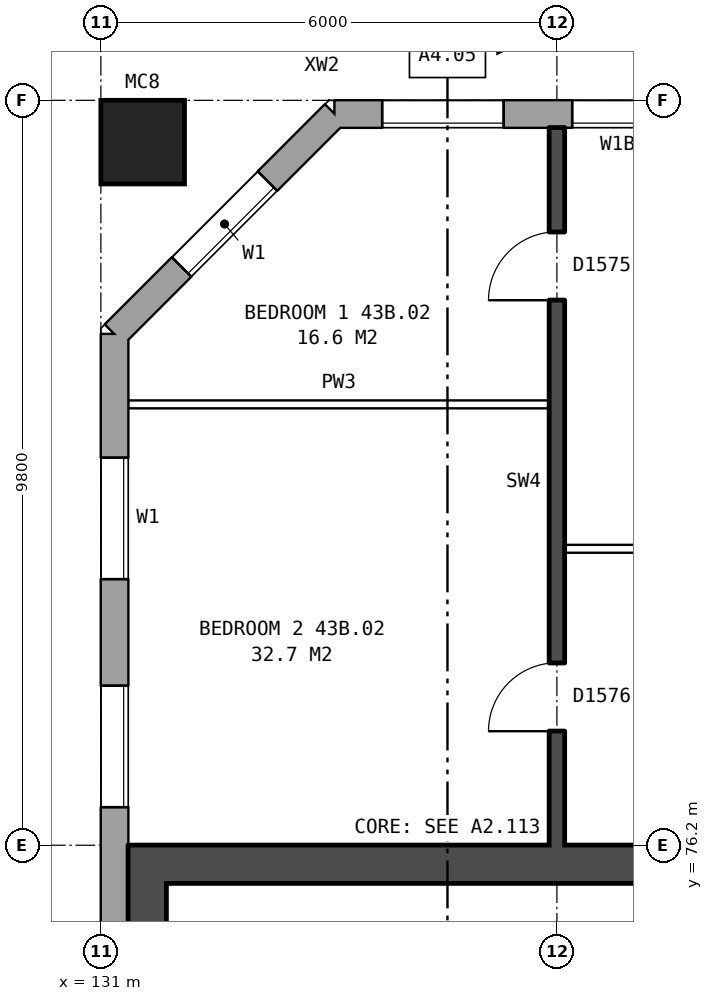
"""IFC4 building model, lengths in metres.
Left out: names, types, materials, properties, quantities, classifications, styles, units other than length and angle.
Written with IfcOpenShell. Run it as: python <this file> out.ifc"""

import sys

from ifc_helpers import new_model, si_unit, direction, frame, frame_2d, origin, origin_2d, place, context, subcontext, project, spatial, rectangle, hollow_rectangle, extrude, element, fill, save


model = new_model("IFC4")
c1 = context("Model", 3, precision=1e-05, world=origin(), true_north=direction((0.0, 1.0)))
c2 = subcontext(c1, "Body", "Model", "MODEL_VIEW")
j1 = project(units=[si_unit("LENGTHUNIT", "METRE"), si_unit("PLANEANGLEUNIT", "RADIAN")], contexts=[c1])
p1 = place(None, origin())
s1 = spatial("IfcSite", under=j1, at=p1, CompositionType="ELEMENT")
p2 = place(p1, origin())
s2 = spatial("IfcBuilding", under=s1, at=p2, CompositionType="ELEMENT")
p3 = place(p2, frame((0.0, 0.0, 154.7)))
s3 = spatial("IfcBuildingStorey", under=s2, at=p3, CompositionType="ELEMENT", Elevation=154.7)
p4 = place(p3, frame((131.55, 85.45, 0.0), z_axis=(0.0, 0.0, 1.0), x_axis=(1.0, 0.0, 0.0)))
e1 = element("IfcColumn", 1, at=p4, inside=s3, PredefinedType="COLUMN", context=c2, shape_type="SweptSolid", body=[
    extrude(hollow_rectangle(XDim=1.1, YDim=1.1, WallThickness=0.06, at=origin_2d()), origin(), (0.0, 0.0, 1.0), 3.1),
])
p5 = place(p3, frame((168.425, 85.82, 0.0), z_axis=(0.0, 0.0, 1.0), x_axis=(-1.0, 0.0, 0.0)))
e2 = element("IfcWall", 2, at=p5, inside=s3, PredefinedType="STANDARD", context=c2, shape_type="SweptSolid", body=[
    extrude(rectangle(XDim=34.351, YDim=0.36, at=frame_2d((17.175, 0.0))), origin(), (0.0, 0.0, 1.0), 2.85),
])
p6 = place(p5, frame((2.125, 0.0, 0.8)))
e3 = element("IfcOpeningElement", 3, at=p6, cuts=e2, PredefinedType="OPENING", context=c2, shape_type="SweptSolid", body=[
    extrude(rectangle(XDim=1.6, YDim=1.8, at=frame_2d((0.8, 0.9))), frame((0.0, 0.19, 0.0), z_axis=(0.0, -1.0, 0.0), x_axis=(1.0, 0.0, 0.0)), (0.0, 0.0, 1.0), 0.38),
])
p7 = place(p5, frame((4.025, 0.0, 1.7)))
e4 = element("IfcOpeningElement", 4, at=p7, cuts=e2, PredefinedType="OPENING", context=c2, shape_type="SweptSolid", body=[
    extrude(rectangle(XDim=1.4, YDim=0.9, at=frame_2d((0.7, 0.45))), frame((0.0, 0.19, 0.0), z_axis=(0.0, -1.0, 0.0), x_axis=(1.0, 0.0, 0.0)), (0.0, 0.0, 1.0), 0.38),
])
p8 = place(p5, frame((8.125, 0.0, 0.8)))
e5 = element("IfcOpeningElement", 5, at=p8, cuts=e2, PredefinedType="OPENING", context=c2, shape_type="SweptSolid", body=[
    extrude(rectangle(XDim=1.6, YDim=1.8, at=frame_2d((0.8, 0.9))), frame((0.0, 0.19, 0.0), z_axis=(0.0, -1.0, 0.0), x_axis=(1.0, 0.0, 0.0)), (0.0, 0.0, 1.0), 0.38),
])
p9 = place(p5, frame((11.125, 0.0, 0.8)))
e6 = element("IfcOpeningElement", 6, at=p9, cuts=e2, PredefinedType="OPENING", context=c2, shape_type="SweptSolid", body=[
    extrude(rectangle(XDim=1.6, YDim=1.8, at=frame_2d((0.8, 0.9))), frame((0.0, 0.19, 0.0), z_axis=(0.0, -1.0, 0.0), x_axis=(1.0, 0.0, 0.0)), (0.0, 0.0, 1.0), 0.38),
])
p10 = place(p5, frame((14.125, 0.0, 0.8)))
e7 = element("IfcOpeningElement", 7, at=p10, cuts=e2, PredefinedType="OPENING", context=c2, shape_type="SweptSolid", body=[
    extrude(rectangle(XDim=1.6, YDim=1.8, at=frame_2d((0.8, 0.9))), frame((0.0, 0.19, 0.0), z_axis=(0.0, -1.0, 0.0), x_axis=(1.0, 0.0, 0.0)), (0.0, 0.0, 1.0), 0.38),
])
p11 = place(p5, frame((17.125, 0.0, 0.8)))
e8 = element("IfcOpeningElement", 8, at=p11, cuts=e2, PredefinedType="OPENING", context=c2, shape_type="SweptSolid", body=[
    extrude(rectangle(XDim=1.6, YDim=1.8, at=frame_2d((0.8, 0.9))), frame((0.0, 0.19, 0.0), z_axis=(0.0, -1.0, 0.0), x_axis=(1.0, 0.0, 0.0)), (0.0, 0.0, 1.0), 0.38),
])
p12 = place(p5, frame((20.125, 0.0, 0.8)))
e9 = element("IfcOpeningElement", 9, at=p12, cuts=e2, PredefinedType="OPENING", context=c2, shape_type="SweptSolid", body=[
    extrude(rectangle(XDim=1.6, YDim=1.8, at=frame_2d((0.8, 0.9))), frame((0.0, 0.19, 0.0), z_axis=(0.0, -1.0, 0.0), x_axis=(1.0, 0.0, 0.0)), (0.0, 0.0, 1.0), 0.38),
])
p13 = place(p5, frame((23.125, 0.0, 0.8)))
e10 = element("IfcOpeningElement", 10, at=p13, cuts=e2, PredefinedType="OPENING", context=c2, shape_type="SweptSolid", body=[
    extrude(rectangle(XDim=1.6, YDim=1.8, at=frame_2d((0.8, 0.9))), frame((0.0, 0.19, 0.0), z_axis=(0.0, -1.0, 0.0), x_axis=(1.0, 0.0, 0.0)), (0.0, 0.0, 1.0), 0.38),
])
p14 = place(p5, frame((25.625, 0.0, 0.8)))
e11 = element("IfcOpeningElement", 11, at=p14, cuts=e2, PredefinedType="OPENING", context=c2, shape_type="SweptSolid", body=[
    extrude(rectangle(XDim=1.0, YDim=1.8, at=frame_2d((0.5, 0.9))), frame((0.0, 0.19, 0.0), z_axis=(0.0, -1.0, 0.0), x_axis=(1.0, 0.0, 0.0)), (0.0, 0.0, 1.0), 0.38),
])
p15 = place(p5, frame((26.925, 0.0, 0.8)))
e12 = element("IfcOpeningElement", 12, at=p15, cuts=e2, PredefinedType="OPENING", context=c2, shape_type="SweptSolid", body=[
    extrude(rectangle(XDim=0.8, YDim=0.9, at=frame_2d((0.4, 0.45))), frame((0.0, 0.19, 0.0), z_axis=(0.0, -1.0, 0.0), x_axis=(1.0, 0.0, 0.0)), (0.0, 0.0, 1.0), 0.38),
])
p16 = place(p5, frame((32.125, 0.0, 0.8)))
e13 = element("IfcOpeningElement", 13, at=p16, cuts=e2, PredefinedType="OPENING", context=c2, shape_type="SweptSolid", body=[
    extrude(rectangle(XDim=1.6, YDim=1.8, at=frame_2d((0.8, 0.9))), frame((0.0, 0.19, 0.0), z_axis=(0.0, -1.0, 0.0), x_axis=(1.0, 0.0, 0.0)), (0.0, 0.0, 1.0), 0.38),
])
p17 = place(p5, frame((6.625, 0.0, 0.8)))
e14 = element("IfcOpeningElement", 14, at=p17, cuts=e2, PredefinedType="OPENING", context=c2, shape_type="SweptSolid", body=[
    extrude(rectangle(XDim=0.6, YDim=0.9, at=frame_2d((0.3, 0.45))), frame((0.0, 0.19, 0.0), z_axis=(0.0, -1.0, 0.0), x_axis=(1.0, 0.0, 0.0)), (0.0, 0.0, 1.0), 0.38),
])
p18 = place(p5, frame((28.925, 0.0, 1.7)))
e15 = element("IfcOpeningElement", 15, at=p18, cuts=e2, PredefinedType="OPENING", context=c2, shape_type="SweptSolid", body=[
    extrude(rectangle(XDim=0.8, YDim=0.9, at=frame_2d((0.4, 0.45))), frame((0.0, 0.19, 0.0), z_axis=(0.0, -1.0, 0.0), x_axis=(1.0, 0.0, 0.0)), (0.0, 0.0, 1.0), 0.38),
])
p19 = place(p5, frame((30.025, 0.0, 0.8)))
e16 = element("IfcOpeningElement", 16, at=p19, cuts=e2, PredefinedType="OPENING", context=c2, shape_type="SweptSolid", body=[
    extrude(rectangle(XDim=1.2, YDim=1.8, at=frame_2d((0.6, 0.9))), frame((0.0, 0.19, 0.0), z_axis=(0.0, -1.0, 0.0), x_axis=(1.0, 0.0, 0.0)), (0.0, 0.0, 1.0), 0.38),
])
p20 = place(p3, frame((134.075, 85.82, 0.0), z_axis=(0.0, 0.0, 1.0), x_axis=(-0.707106781187, -0.707106781187, 0.0)))
e17 = element("IfcWall", 17, at=p20, inside=s3, PredefinedType="STANDARD", context=c2, shape_type="SweptSolid", body=[
    extrude(rectangle(XDim=4.094, YDim=0.36, at=frame_2d((2.047, 0.0))), origin(), (0.0, 0.0, 1.0), 2.85),
])
p21 = place(p20, frame((1.247, 0.0, 0.8)))
e18 = element("IfcOpeningElement", 18, at=p21, cuts=e17, PredefinedType="OPENING", context=c2, shape_type="SweptSolid", body=[
    extrude(rectangle(XDim=1.6, YDim=1.8, at=frame_2d((0.8, 0.9))), frame((0.0, 0.19, 0.0), z_axis=(0.0, -1.0, 0.0), x_axis=(1.0, 0.0, 0.0)), (0.0, 0.0, 1.0), 0.38),
])
p22 = place(p3, frame((131.18, 82.925, 0.0), z_axis=(0.0, 0.0, 1.0), x_axis=(0.0, -1.0, 0.0)))
e19 = element("IfcWall", 19, at=p22, inside=s3, PredefinedType="STANDARD", context=c2, shape_type="SweptSolid", body=[
    extrude(rectangle(XDim=25.851, YDim=0.36, at=frame_2d((12.925, 0.0))), origin(), (0.0, 0.0, 1.0), 2.85),
])
p23 = place(p22, frame((1.625, 0.0, 0.8)))
e20 = element("IfcOpeningElement", 20, at=p23, cuts=e19, PredefinedType="OPENING", context=c2, shape_type="SweptSolid", body=[
    extrude(rectangle(XDim=1.6, YDim=1.8, at=frame_2d((0.8, 0.9))), frame((0.0, 0.19, 0.0), z_axis=(0.0, -1.0, 0.0), x_axis=(1.0, 0.0, 0.0)), (0.0, 0.0, 1.0), 0.38),
])
p24 = place(p22, frame((4.625, 0.0, 0.8)))
e21 = element("IfcOpeningElement", 21, at=p24, cuts=e19, PredefinedType="OPENING", context=c2, shape_type="SweptSolid", body=[
    extrude(rectangle(XDim=1.6, YDim=1.8, at=frame_2d((0.8, 0.9))), frame((0.0, 0.19, 0.0), z_axis=(0.0, -1.0, 0.0), x_axis=(1.0, 0.0, 0.0)), (0.0, 0.0, 1.0), 0.38),
])
p25 = place(p22, frame((19.625, 0.0, 0.8)))
e22 = element("IfcOpeningElement", 22, at=p25, cuts=e19, PredefinedType="OPENING", context=c2, shape_type="SweptSolid", body=[
    extrude(rectangle(XDim=1.6, YDim=1.8, at=frame_2d((0.8, 0.9))), frame((0.0, 0.19, 0.0), z_axis=(0.0, -1.0, 0.0), x_axis=(1.0, 0.0, 0.0)), (0.0, 0.0, 1.0), 0.38),
])
p26 = place(p22, frame((22.625, 0.0, 0.8)))
e23 = element("IfcOpeningElement", 23, at=p26, cuts=e19, PredefinedType="OPENING", context=c2, shape_type="SweptSolid", body=[
    extrude(rectangle(XDim=1.6, YDim=1.8, at=frame_2d((0.8, 0.9))), frame((0.0, 0.19, 0.0), z_axis=(0.0, -1.0, 0.0), x_axis=(1.0, 0.0, 0.0)), (0.0, 0.0, 1.0), 0.38),
])
p27 = place(p3, frame((131.61, 63.8, 0.0), z_axis=(0.0, 0.0, 1.0), x_axis=(0.0, 1.0, 0.0)))
e24 = element("IfcWall", 24, at=p27, inside=s3, PredefinedType="SHEAR", context=c2, shape_type="SweptSolid", body=[
    extrude(rectangle(XDim=12.4, YDim=0.5, at=frame_2d((6.2, 0.0))), origin(), (0.0, 0.0, 1.0), 2.85),
])
p28 = place(p3, frame((139.26, 75.95, 0.0), z_axis=(0.0, 0.0, 1.0), x_axis=(-1.0, 0.0, 0.0)))
e25 = element("IfcWall", 25, at=p28, inside=s3, PredefinedType="SHEAR", context=c2, shape_type="SweptSolid", body=[
    extrude(rectangle(XDim=7.4, YDim=0.5, at=frame_2d((3.7, 0.0))), origin(), (0.0, 0.0, 1.0), 2.85),
])
p29 = place(p3, frame((137.1, 80.1, 0.0), z_axis=(0.0, 0.0, 1.0), x_axis=(1.0, 0.0, 0.0)))
e26 = element("IfcWall", 26, at=p29, inside=s3, PredefinedType="PARTITIONING", context=c2, shape_type="SweptSolid", body=[
    extrude(rectangle(XDim=5.8, YDim=0.1, at=frame_2d((2.9, 0.0))), origin(), (0.0, 0.0, 1.0), 2.85),
])
p30 = place(p29, frame((1.3, 0.0, 0.0)))
e27 = element("IfcOpeningElement", 27, at=p30, cuts=e26, PredefinedType="OPENING", context=c2, shape_type="SweptSolid", body=[
    extrude(rectangle(XDim=0.9, YDim=2.1, at=frame_2d((0.45, 1.05))), frame((0.0, 0.06, 0.0), z_axis=(0.0, -1.0, 0.0), x_axis=(1.0, 0.0, 0.0)), (0.0, 0.0, 1.0), 0.12),
])
p31 = place(p29, frame((4.2, 0.0, 0.0)))
e28 = element("IfcOpeningElement", 28, at=p31, cuts=e26, PredefinedType="OPENING", context=c2, shape_type="SweptSolid", body=[
    extrude(rectangle(XDim=0.9, YDim=2.1, at=frame_2d((0.45, 1.05))), frame((0.0, 0.06, 0.0), z_axis=(0.0, -1.0, 0.0), x_axis=(1.0, 0.0, 0.0)), (0.0, 0.0, 1.0), 0.12),
])
p32 = place(p3, frame((131.36, 82.0, 0.0), z_axis=(0.0, 0.0, 1.0), x_axis=(1.0, 0.0, 0.0)))
e29 = element("IfcWall", 29, at=p32, inside=s3, PredefinedType="PARTITIONING", context=c2, shape_type="SweptSolid", body=[
    extrude(rectangle(XDim=5.54, YDim=0.1, at=frame_2d((2.77, 0.0))), origin(), (0.0, 0.0, 1.0), 2.85),
])
p33 = place(p3, frame((137.0, 76.2, 0.0), z_axis=(0.0, 0.0, 1.0), x_axis=(0.0, 1.0, 0.0)))
e30 = element("IfcWall", 30, at=p33, inside=s3, PredefinedType="SOLIDWALL", context=c2, shape_type="SweptSolid", body=[
    extrude(rectangle(XDim=9.44, YDim=0.2, at=frame_2d((4.72, 0.0))), origin(), (0.0, 0.0, 1.0), 2.85),
])
p34 = place(p33, frame((7.17, 0.0, 0.0)))
e31 = element("IfcOpeningElement", 31, at=p34, cuts=e30, PredefinedType="OPENING", context=c2, shape_type="SweptSolid", body=[
    extrude(rectangle(XDim=0.9, YDim=2.1, at=frame_2d((0.45, 1.05))), frame((0.0, 0.11, 0.0), z_axis=(0.0, -1.0, 0.0), x_axis=(1.0, 0.0, 0.0)), (0.0, 0.0, 1.0), 0.22),
])
p35 = place(p33, frame((1.5, 0.0, 0.0)))
e32 = element("IfcOpeningElement", 32, at=p35, cuts=e30, PredefinedType="OPENING", context=c2, shape_type="SweptSolid", body=[
    extrude(rectangle(XDim=0.9, YDim=2.1, at=frame_2d((0.45, 1.05))), frame((0.0, 0.11, 0.0), z_axis=(0.0, -1.0, 0.0), x_axis=(1.0, 0.0, 0.0)), (0.0, 0.0, 1.0), 0.22),
])
p36 = place(p16, origin())
e33 = element("IfcWindow", 33, at=p36, inside=s3, PartitioningType="SINGLE_PANEL", PredefinedType="WINDOW", context=c2, shape_type="SweptSolid", body=[
    extrude(rectangle(XDim=1.6, YDim=1.8, at=frame_2d((0.8, 0.9))), frame((0.0, 0.15, 0.0), z_axis=(0.0, -1.0, 0.0), x_axis=(1.0, 0.0, 0.0)), (0.0, 0.0, 1.0), 0.06),
])
fill(e13, e33)
p37 = place(p21, origin())
e34 = element("IfcWindow", 34, at=p37, inside=s3, PartitioningType="SINGLE_PANEL", PredefinedType="WINDOW", context=c2, shape_type="SweptSolid", body=[
    extrude(rectangle(XDim=1.6, YDim=1.8, at=frame_2d((0.8, 0.9))), frame((0.0, 0.15, 0.0), z_axis=(0.0, -1.0, 0.0), x_axis=(1.0, 0.0, 0.0)), (0.0, 0.0, 1.0), 0.06),
])
fill(e18, e34)
p38 = place(p23, origin())
e35 = element("IfcWindow", 35, at=p38, inside=s3, PartitioningType="SINGLE_PANEL", PredefinedType="WINDOW", context=c2, shape_type="SweptSolid", body=[
    extrude(rectangle(XDim=1.6, YDim=1.8, at=frame_2d((0.8, 0.9))), frame((0.0, 0.15, 0.0), z_axis=(0.0, -1.0, 0.0), x_axis=(1.0, 0.0, 0.0)), (0.0, 0.0, 1.0), 0.06),
])
fill(e20, e35)
p39 = place(p24, origin())
e36 = element("IfcWindow", 36, at=p39, inside=s3, PartitioningType="SINGLE_PANEL", PredefinedType="WINDOW", context=c2, shape_type="SweptSolid", body=[
    extrude(rectangle(XDim=1.6, YDim=1.8, at=frame_2d((0.8, 0.9))), frame((0.0, 0.15, 0.0), z_axis=(0.0, -1.0, 0.0), x_axis=(1.0, 0.0, 0.0)), (0.0, 0.0, 1.0), 0.06),
])
fill(e21, e36)
p40 = place(p34, origin())
e37 = element("IfcDoor", 37, at=p40, inside=s3, OperationType="SINGLE_SWING_LEFT", PredefinedType="DOOR", context=c2, shape_type="SweptSolid", body=[
    extrude(rectangle(XDim=0.9, YDim=2.1, at=frame_2d((0.45, 1.05))), frame((0.0, 0.025, 0.0), z_axis=(0.0, -1.0, 0.0), x_axis=(1.0, 0.0, 0.0)), (0.0, 0.0, 1.0), 0.05),
])
fill(e31, e37)
p41 = place(p35, origin())
e38 = element("IfcDoor", 38, at=p41, inside=s3, OperationType="SINGLE_SWING_LEFT", PredefinedType="DOOR", context=c2, shape_type="SweptSolid", body=[
    extrude(rectangle(XDim=0.9, YDim=2.1, at=frame_2d((0.45, 1.05))), frame((0.0, 0.025, 0.0), z_axis=(0.0, -1.0, 0.0), x_axis=(1.0, 0.0, 0.0)), (0.0, 0.0, 1.0), 0.05),
])
fill(e32, e38)
p42 = place(p19, origin())
e39 = element("IfcWindow", 39, at=p42, inside=s3, PartitioningType="SINGLE_PANEL", PredefinedType="WINDOW", context=c2, shape_type="SweptSolid", body=[
    extrude(rectangle(XDim=1.2, YDim=1.8, at=frame_2d((0.6, 0.9))), frame((0.0, 0.15, 0.0), z_axis=(0.0, -1.0, 0.0), x_axis=(1.0, 0.0, 0.0)), (0.0, 0.0, 1.0), 0.06),
])
fill(e16, e39)
save(model, sys.argv[1])
